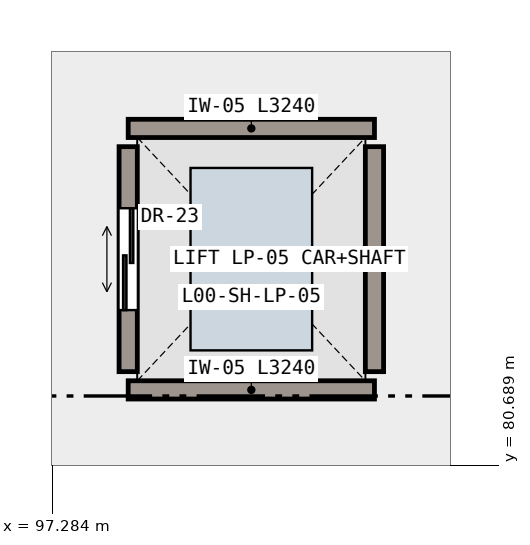
"""IFC4 building model, lengths in metres.
Left out: names, types, materials, properties, quantities, classifications, styles, units other than length and angle.
Written with IfcOpenShell. Run it as: python <this file> out.ifc"""

import sys

from ifc_helpers import new_model, si_unit, direction, frame, frame_2d, origin, place, context, subcontext, project, spatial, rectangle, extrude, element, fill, save


model = new_model("IFC4")
c1 = context("Model", 3, precision=1e-05, world=origin(), true_north=direction((0.0, 1.0)))
c2 = subcontext(c1, "Body", "Model", "MODEL_VIEW")
j1 = project(units=[si_unit("LENGTHUNIT", "METRE"), si_unit("PLANEANGLEUNIT", "RADIAN")], contexts=[c1])
p1 = place(None, origin())
s1 = spatial("IfcSite", under=j1, at=p1, CompositionType="ELEMENT")
p2 = place(p1, origin())
s2 = spatial("IfcBuilding", under=s1, at=p2, CompositionType="ELEMENT")
p3 = place(p2, origin())
s3 = spatial("IfcBuildingStorey", under=s2, at=p3, CompositionType="ELEMENT", Elevation=0.0)
for number, where, z_axis, x_axis in (
    (1, (101.52, 81.68, 0.0), (0.0, 0.0, 1.0), (-1.0, 0.0, 0.0)),
    (2, (98.28, 85.12, 0.0), (0.0, 0.0, 1.0), (1.0, 0.0, 0.0)),
):
    element("IfcWall", number, at=place(p3, frame(where, z_axis=z_axis, x_axis=x_axis)), inside=s3, PredefinedType="SHEAR", context=c2, shape_type="SweptSolid", body=[
        extrude(rectangle(XDim=3.24, YDim=0.24, at=frame_2d((1.62, 0.0))), origin(), (0.0, 0.0, 1.0), 5.12),
    ])
p4 = place(p3, frame((98.28, 81.92, 0.0), z_axis=(0.0, 0.0, 1.0), x_axis=(0.0, 1.0, 0.0)))
e3 = element("IfcWall", 3, at=p4, inside=s3, PredefinedType="SHEAR", context=c2, shape_type="SweptSolid", body=[
    extrude(rectangle(XDim=2.96, YDim=0.24, at=frame_2d((1.48, 0.0))), origin(), (0.0, 0.0, 1.0), 5.12),
])
p5 = place(p4, frame((0.81, 0.0, 0.0)))
e4 = element("IfcOpeningElement", 4, at=p5, cuts=e3, PredefinedType="OPENING", context=c2, shape_type="SweptSolid", body=[
    extrude(rectangle(XDim=1.34, YDim=2.18, at=frame_2d((0.67, 1.09))), frame((0.0, 0.13, 0.0), z_axis=(0.0, -1.0, 0.0), x_axis=(1.0, 0.0, 0.0)), (0.0, 0.0, 1.0), 0.26),
])
p6 = place(p3, frame((101.52, 84.88, 0.0), z_axis=(0.0, 0.0, 1.0), x_axis=(0.0, -1.0, 0.0)))
e5 = element("IfcWall", 5, at=p6, inside=s3, PredefinedType="SHEAR", context=c2, shape_type="SweptSolid", body=[
    extrude(rectangle(XDim=2.96, YDim=0.24, at=frame_2d((1.48, 0.0))), origin(), (0.0, 0.0, 1.0), 5.12),
])
p7 = place(p5, origin())
e6 = element("IfcDoor", 6, at=p7, inside=s3, OperationType="DOUBLE_DOOR_SLIDING", PredefinedType="DOOR", context=c2, shape_type="SweptSolid", body=[
    extrude(rectangle(XDim=1.34, YDim=2.18, at=frame_2d((0.67, 1.09))), frame((0.0, 0.025, 0.0), z_axis=(0.0, -1.0, 0.0), x_axis=(1.0, 0.0, 0.0)), (0.0, 0.0, 1.0), 0.05),
])
fill(e4, e6)
save(model, sys.argv[1])
